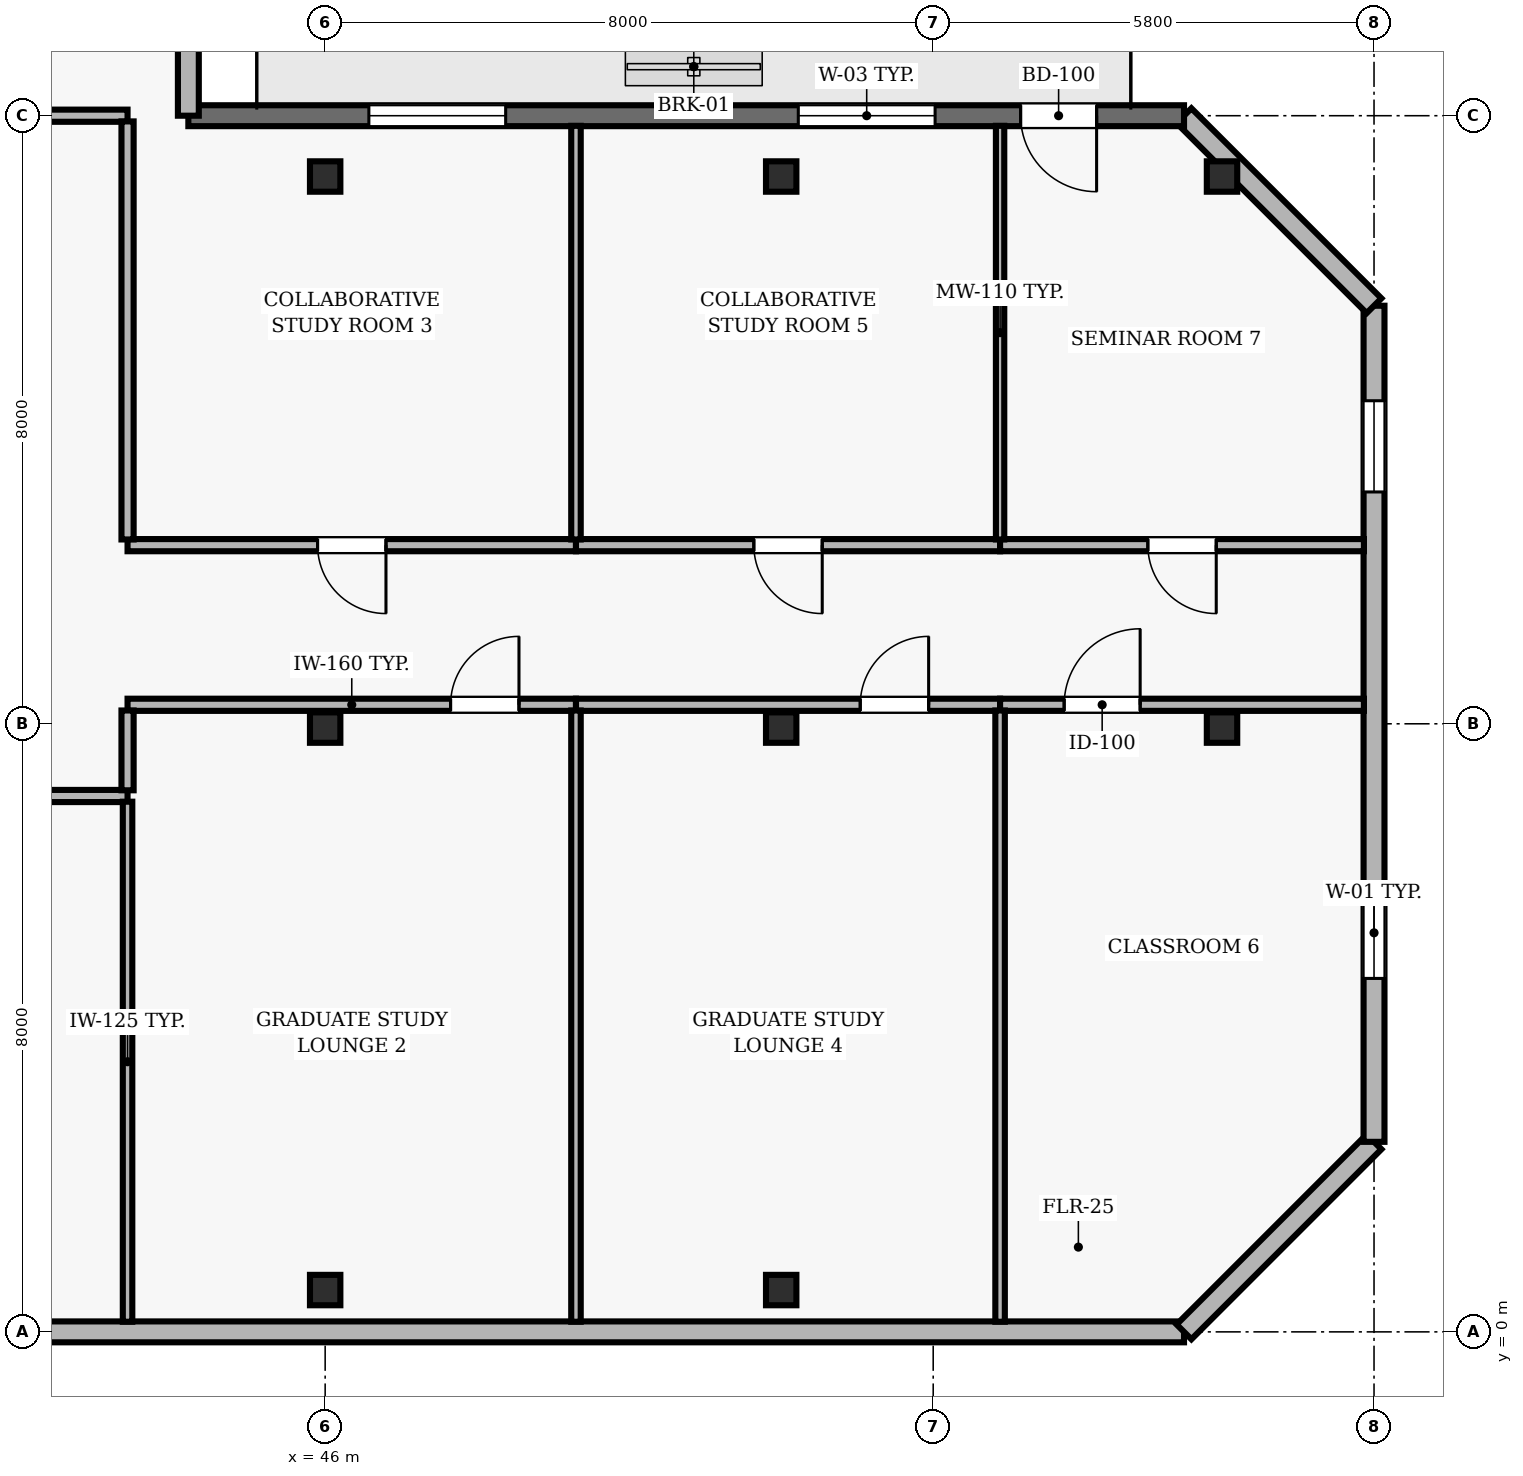
"""IFC4 building model, lengths in metres.
Left out: names, types, materials, properties, quantities, classifications, styles, units other than length and angle.
Written with IfcOpenShell. Run it as: python <this file> out.ifc"""

import sys

from ifc_helpers import new_model, si_unit, direction, frame, frame_2d, origin, origin_2d, place, context, subcontext, project, spatial, rectangle, hollow_rectangle, extrude, element, fill, save


model = new_model("IFC4")
c1 = context("Model", 3, precision=1e-05, world=origin(), true_north=direction((0.0, 1.0)))
c2 = subcontext(c1, "Body", "Model", "MODEL_VIEW")
j1 = project(units=[si_unit("LENGTHUNIT", "METRE"), si_unit("PLANEANGLEUNIT", "RADIAN")], contexts=[c1])
p1 = place(None, origin())
s1 = spatial("IfcSite", under=j1, at=p1, CompositionType="ELEMENT")
p2 = place(p1, origin())
s2 = spatial("IfcBuilding", under=s1, at=p2, CompositionType="ELEMENT")
p3 = place(p2, frame((0.0, 0.0, 287.2)))
s3 = spatial("IfcBuildingStorey", under=s2, at=p3, CompositionType="ELEMENT", Elevation=287.2)
for number, where, z_axis, x_axis in (
    (1, (46.0, 0.55, 0.0), (0.0, 0.0, 1.0), (1.0, 0.0, 0.0)),
    (2, (46.0, 7.95, 0.0), (0.0, 0.0, 1.0), (1.0, 0.0, 0.0)),
    (3, (46.0, 15.2, 0.0), (0.0, 0.0, 1.0), (1.0, 0.0, 0.0)),
    (4, (52.0, 0.55, 0.0), (0.0, 0.0, 1.0), (1.0, 0.0, 0.0)),
    (5, (52.0, 7.95, 0.0), (0.0, 0.0, 1.0), (1.0, 0.0, 0.0)),
    (6, (52.0, 15.2, 0.0), (0.0, 0.0, 1.0), (1.0, 0.0, 0.0)),
    (7, (57.8, 7.95, 0.0), (0.0, 0.0, 1.0), (1.0, 0.0, 0.0)),
    (8, (57.8, 15.2, 0.0), (0.0, 0.0, 1.0), (1.0, 0.0, 0.0)),
):
    element("IfcColumn", number, at=place(p3, frame(where, z_axis=z_axis, x_axis=x_axis)), inside=s3, PredefinedType="COLUMN", context=c2, shape_type="SweptSolid", body=[
        extrude(hollow_rectangle(XDim=0.4, YDim=0.4, WallThickness=0.02, at=origin_2d()), origin(), (0.0, 0.0, 1.0), 3.9),
    ])
p4 = place(p3, frame((24.5, 0.0, 0.0), z_axis=(0.0, 0.0, 1.0), x_axis=(1.0, 0.0, 0.0)))
e9 = element("IfcWall", 9, at=p4, inside=s3, PredefinedType="SOLIDWALL", context=c2, shape_type="SweptSolid", body=[
    extrude(rectangle(XDim=32.8, YDim=0.275, at=frame_2d((16.4, 0.0))), origin(), (0.0, 0.0, 1.0), 3.69),
])
p5 = place(p4, frame((1.533, 0.0, 0.9)))
e10 = element("IfcOpeningElement", 10, at=p5, cuts=e9, PredefinedType="OPENING", context=c2, shape_type="SweptSolid", body=[
    extrude(rectangle(XDim=2.4, YDim=2.2, at=frame_2d((1.2, 1.1))), frame((0.0, 0.147, 0.0), z_axis=(0.0, -1.0, 0.0), x_axis=(1.0, 0.0, 0.0)), (0.0, 0.0, 1.0), 0.295),
])
p6 = place(p3, frame((57.3, 0.0, 0.0), z_axis=(0.0, 0.0, 1.0), x_axis=(0.707106781187, 0.707106781187, 0.0)))
e11 = element("IfcWall", 11, at=p6, inside=s3, PredefinedType="SOLIDWALL", context=c2, shape_type="SweptSolid", body=[
    extrude(rectangle(XDim=3.536, YDim=0.275, at=frame_2d((1.768, 0.0))), origin(), (0.0, 0.0, 1.0), 3.69),
])
p7 = place(p3, frame((59.8, 2.5, 0.0), z_axis=(0.0, 0.0, 1.0), x_axis=(0.0, 1.0, 0.0)))
e12 = element("IfcWall", 12, at=p7, inside=s3, PredefinedType="SOLIDWALL", context=c2, shape_type="SweptSolid", body=[
    extrude(rectangle(XDim=11.0, YDim=0.275, at=frame_2d((5.5, 0.0))), origin(), (0.0, 0.0, 1.0), 3.69),
])
p8 = place(p7, frame((2.15, 0.0, 0.9)))
e13 = element("IfcOpeningElement", 13, at=p8, cuts=e12, PredefinedType="OPENING", context=c2, shape_type="SweptSolid", body=[
    extrude(rectangle(XDim=1.2, YDim=1.6, at=frame_2d((0.6, 0.8))), frame((0.0, 0.147, 0.0), z_axis=(0.0, -1.0, 0.0), x_axis=(1.0, 0.0, 0.0)), (0.0, 0.0, 1.0), 0.295),
])
p9 = place(p7, frame((8.55, 0.0, 0.9)))
e14 = element("IfcOpeningElement", 14, at=p9, cuts=e12, PredefinedType="OPENING", context=c2, shape_type="SweptSolid", body=[
    extrude(rectangle(XDim=1.2, YDim=1.6, at=frame_2d((0.6, 0.8))), frame((0.0, 0.147, 0.0), z_axis=(0.0, -1.0, 0.0), x_axis=(1.0, 0.0, 0.0)), (0.0, 0.0, 1.0), 0.295),
])
p10 = place(p3, frame((59.8, 13.5, 0.0), z_axis=(0.0, 0.0, 1.0), x_axis=(-0.707106781187, 0.707106781187, 0.0)))
e15 = element("IfcWall", 15, at=p10, inside=s3, PredefinedType="SOLIDWALL", context=c2, shape_type="SweptSolid", body=[
    extrude(rectangle(XDim=3.536, YDim=0.275, at=frame_2d((1.768, 0.0))), origin(), (0.0, 0.0, 1.0), 3.69),
])
p11 = place(p3, frame((57.3, 16.0, 0.0), z_axis=(0.0, 0.0, 1.0), x_axis=(-1.0, 0.0, 0.0)))
e16 = element("IfcWall", 16, at=p11, inside=s3, PredefinedType="SOLIDWALL", context=c2, shape_type="SweptSolid", body=[
    extrude(rectangle(XDim=13.1, YDim=0.275, at=frame_2d((6.55, 0.0))), origin(), (0.0, 0.0, 1.0), 3.69),
])
p12 = place(p11, frame((1.15, 0.0, 0.0)))
e17 = element("IfcOpeningElement", 17, at=p12, cuts=e16, PredefinedType="OPENING", context=c2, shape_type="SweptSolid", body=[
    extrude(rectangle(XDim=1.0, YDim=2.2, at=frame_2d((0.5, 1.1))), frame((0.0, 0.147, 0.0), z_axis=(0.0, -1.0, 0.0), x_axis=(1.0, 0.0, 0.0)), (0.0, 0.0, 1.0), 0.295),
])
p13 = place(p11, frame((3.275, 0.0, 0.9)))
e18 = element("IfcOpeningElement", 18, at=p13, cuts=e16, PredefinedType="OPENING", context=c2, shape_type="SweptSolid", body=[
    extrude(rectangle(XDim=1.8, YDim=1.6, at=frame_2d((0.9, 0.8))), frame((0.0, 0.147, 0.0), z_axis=(0.0, -1.0, 0.0), x_axis=(1.0, 0.0, 0.0)), (0.0, 0.0, 1.0), 0.295),
])
p14 = place(p11, frame((8.925, 0.0, 0.9)))
e19 = element("IfcOpeningElement", 19, at=p14, cuts=e16, PredefinedType="OPENING", context=c2, shape_type="SweptSolid", body=[
    extrude(rectangle(XDim=1.8, YDim=1.6, at=frame_2d((0.9, 0.8))), frame((0.0, 0.147, 0.0), z_axis=(0.0, -1.0, 0.0), x_axis=(1.0, 0.0, 0.0)), (0.0, 0.0, 1.0), 0.295),
])
p15 = place(p3, frame((44.2, 16.0, 0.0), z_axis=(0.0, 0.0, 1.0), x_axis=(0.0, 1.0, 0.0)))
e20 = element("IfcWall", 20, at=p15, inside=s3, PredefinedType="SOLIDWALL", context=c2, shape_type="SweptSolid", body=[
    extrude(rectangle(XDim=4.4, YDim=0.275, at=frame_2d((2.2, 0.0))), origin(), (0.0, 0.0, 1.0), 3.69),
])
p16 = place(p3, frame((38.05, 7.05, 0.0), z_axis=(0.0, 0.0, 1.0), x_axis=(1.0, 0.0, 0.0)))
e21 = element("IfcWall", 21, at=p16, inside=s3, PredefinedType="PARTITIONING", context=c2, shape_type="SweptSolid", body=[
    extrude(rectangle(XDim=5.35, YDim=0.16, at=frame_2d((2.675, 0.0))), origin(), (0.0, 0.0, 1.0), 3.69),
])
p17 = place(p16, frame((2.225, 0.0, 0.0)))
e22 = element("IfcOpeningElement", 22, at=p17, cuts=e21, PredefinedType="OPENING", context=c2, shape_type="SweptSolid", body=[
    extrude(rectangle(XDim=0.9, YDim=2.1, at=frame_2d((0.45, 1.05))), frame((0.0, 0.09, 0.0), z_axis=(0.0, -1.0, 0.0), x_axis=(1.0, 0.0, 0.0)), (0.0, 0.0, 1.0), 0.18),
])
p18 = place(p3, frame((43.4, 8.25, 0.0), z_axis=(0.0, 0.0, 1.0), x_axis=(1.0, 0.0, 0.0)))
e23 = element("IfcWall", 23, at=p18, inside=s3, PredefinedType="PARTITIONING", context=c2, shape_type="SweptSolid", body=[
    extrude(rectangle(XDim=5.9, YDim=0.16, at=frame_2d((2.95, 0.0))), origin(), (0.0, 0.0, 1.0), 3.221),
])
p19 = place(p18, frame((4.25, 0.0, 0.0)))
e24 = element("IfcOpeningElement", 24, at=p19, cuts=e23, PredefinedType="OPENING", context=c2, shape_type="SweptSolid", body=[
    extrude(rectangle(XDim=0.9, YDim=2.1, at=frame_2d((0.45, 1.05))), frame((0.0, 0.09, 0.0), z_axis=(0.0, -1.0, 0.0), x_axis=(1.0, 0.0, 0.0)), (0.0, 0.0, 1.0), 0.18),
])
p20 = place(p3, frame((43.4, 16.0, 0.0), z_axis=(0.0, 0.0, 1.0), x_axis=(-1.0, 0.0, 0.0)))
e25 = element("IfcWall", 25, at=p20, inside=s3, PredefinedType="PARTITIONING", context=c2, shape_type="SweptSolid", body=[
    extrude(rectangle(XDim=5.35, YDim=0.16, at=frame_2d((2.675, 0.0))), origin(), (0.0, 0.0, 1.0), 3.39),
])
p21 = place(p20, frame((2.225, 0.0, 0.0)))
e26 = element("IfcOpeningElement", 26, at=p21, cuts=e25, PredefinedType="OPENING", context=c2, shape_type="SweptSolid", body=[
    extrude(rectangle(XDim=0.9, YDim=2.1, at=frame_2d((0.45, 1.05))), frame((0.0, 0.09, 0.0), z_axis=(0.0, -1.0, 0.0), x_axis=(1.0, 0.0, 0.0)), (0.0, 0.0, 1.0), 0.18),
])
p22 = place(p3, frame((49.3, 8.25, 0.0), z_axis=(0.0, 0.0, 1.0), x_axis=(1.0, 0.0, 0.0)))
e27 = element("IfcWall", 27, at=p22, inside=s3, PredefinedType="PARTITIONING", context=c2, shape_type="SweptSolid", body=[
    extrude(rectangle(XDim=5.58, YDim=0.16, at=frame_2d((2.79, 0.0))), origin(), (0.0, 0.0, 1.0), 3.221),
])
p23 = place(p22, frame((3.74, 0.0, 0.0)))
e28 = element("IfcOpeningElement", 28, at=p23, cuts=e27, PredefinedType="OPENING", context=c2, shape_type="SweptSolid", body=[
    extrude(rectangle(XDim=0.9, YDim=2.1, at=frame_2d((0.45, 1.05))), frame((0.0, 0.09, 0.0), z_axis=(0.0, -1.0, 0.0), x_axis=(1.0, 0.0, 0.0)), (0.0, 0.0, 1.0), 0.18),
])
p24 = place(p3, frame((49.3, 10.35, 0.0), z_axis=(0.0, 0.0, 1.0), x_axis=(-1.0, 0.0, 0.0)))
e29 = element("IfcWall", 29, at=p24, inside=s3, PredefinedType="PARTITIONING", context=c2, shape_type="SweptSolid", body=[
    extrude(rectangle(XDim=5.9, YDim=0.16, at=frame_2d((2.95, 0.0))), origin(), (0.0, 0.0, 1.0), 3.372),
])
p25 = place(p24, frame((2.5, 0.0, 0.0)))
e30 = element("IfcOpeningElement", 30, at=p25, cuts=e29, PredefinedType="OPENING", context=c2, shape_type="SweptSolid", body=[
    extrude(rectangle(XDim=0.9, YDim=2.1, at=frame_2d((0.45, 1.05))), frame((0.0, 0.09, 0.0), z_axis=(0.0, -1.0, 0.0), x_axis=(1.0, 0.0, 0.0)), (0.0, 0.0, 1.0), 0.18),
])
p26 = place(p3, frame((54.88, 8.25, 0.0), z_axis=(0.0, 0.0, 1.0), x_axis=(1.0, 0.0, 0.0)))
e31 = element("IfcWall", 31, at=p26, inside=s3, PredefinedType="PARTITIONING", context=c2, shape_type="SweptSolid", body=[
    extrude(rectangle(XDim=4.787, YDim=0.16, at=frame_2d((2.394, 0.0))), origin(), (0.0, 0.0, 1.0), 3.221),
])
p27 = place(p26, frame((0.843, 0.0, 0.0)))
e32 = element("IfcOpeningElement", 32, at=p27, cuts=e31, PredefinedType="OPENING", context=c2, shape_type="SweptSolid", body=[
    extrude(rectangle(XDim=1.0, YDim=2.1, at=frame_2d((0.5, 1.05))), frame((0.0, 0.09, 0.0), z_axis=(0.0, -1.0, 0.0), x_axis=(1.0, 0.0, 0.0)), (0.0, 0.0, 1.0), 0.18),
])
p28 = place(p3, frame((54.88, 10.35, 0.0), z_axis=(0.0, 0.0, 1.0), x_axis=(-1.0, 0.0, 0.0)))
e33 = element("IfcWall", 33, at=p28, inside=s3, PredefinedType="PARTITIONING", context=c2, shape_type="SweptSolid", body=[
    extrude(rectangle(XDim=5.58, YDim=0.16, at=frame_2d((2.79, 0.0))), origin(), (0.0, 0.0, 1.0), 3.372),
])
p29 = place(p28, frame((2.34, 0.0, 0.0)))
e34 = element("IfcOpeningElement", 34, at=p29, cuts=e33, PredefinedType="OPENING", context=c2, shape_type="SweptSolid", body=[
    extrude(rectangle(XDim=0.9, YDim=2.1, at=frame_2d((0.45, 1.05))), frame((0.0, 0.09, 0.0), z_axis=(0.0, -1.0, 0.0), x_axis=(1.0, 0.0, 0.0)), (0.0, 0.0, 1.0), 0.18),
])
p30 = place(p3, frame((59.667, 10.35, 0.0), z_axis=(0.0, 0.0, 1.0), x_axis=(-1.0, 0.0, 0.0)))
e35 = element("IfcWall", 35, at=p30, inside=s3, PredefinedType="PARTITIONING", context=c2, shape_type="SweptSolid", body=[
    extrude(rectangle(XDim=4.787, YDim=0.16, at=frame_2d((2.394, 0.0))), origin(), (0.0, 0.0, 1.0), 3.372),
])
p31 = place(p30, frame((1.943, 0.0, 0.0)))
e36 = element("IfcOpeningElement", 36, at=p31, cuts=e35, PredefinedType="OPENING", context=c2, shape_type="SweptSolid", body=[
    extrude(rectangle(XDim=0.9, YDim=2.1, at=frame_2d((0.45, 1.05))), frame((0.0, 0.09, 0.0), z_axis=(0.0, -1.0, 0.0), x_axis=(1.0, 0.0, 0.0)), (0.0, 0.0, 1.0), 0.18),
])
p32 = place(p3, frame((43.4, 0.133, 0.0), z_axis=(0.0, 0.0, 1.0), x_axis=(0.0, 1.0, 0.0)))
e37 = element("IfcWall", 37, at=p32, inside=s3, PredefinedType="PARTITIONING", context=c2, shape_type="SweptSolid", body=[
    extrude(rectangle(XDim=6.842, YDim=0.125, at=frame_2d((3.421, 0.0))), origin(), (0.0, 0.0, 1.0), 3.69),
])
p33 = place(p3, frame((43.4, 7.125, 0.0), z_axis=(0.0, 0.0, 1.0), x_axis=(0.0, 1.0, 0.0)))
e38 = element("IfcWall", 38, at=p33, inside=s3, PredefinedType="PARTITIONING", context=c2, shape_type="SweptSolid", body=[
    extrude(rectangle(XDim=1.05, YDim=0.16, at=frame_2d((0.525, 0.0))), origin(), (0.0, 0.0, 1.0), 3.69),
])
p34 = place(p3, frame((43.4, 10.425, 0.0), z_axis=(0.0, 0.0, 1.0), x_axis=(0.0, 1.0, 0.0)))
e39 = element("IfcWall", 39, at=p34, inside=s3, PredefinedType="PARTITIONING", context=c2, shape_type="SweptSolid", body=[
    extrude(rectangle(XDim=5.5, YDim=0.16, at=frame_2d((2.75, 0.0))), origin(), (0.0, 0.0, 1.0), 3.69),
])
p35 = place(p3, frame((49.3, 0.133, 0.0), z_axis=(0.0, 0.0, 1.0), x_axis=(0.0, 1.0, 0.0)))
e40 = element("IfcWall", 40, at=p35, inside=s3, PredefinedType="PARTITIONING", context=c2, shape_type="SweptSolid", body=[
    extrude(rectangle(XDim=8.042, YDim=0.125, at=frame_2d((4.021, 0.0))), origin(), (0.0, 0.0, 1.0), 3.69),
])
p36 = place(p3, frame((49.3, 10.425, 0.0), z_axis=(0.0, 0.0, 1.0), x_axis=(0.0, 1.0, 0.0)))
e41 = element("IfcWall", 41, at=p36, inside=s3, PredefinedType="PARTITIONING", context=c2, shape_type="SweptSolid", body=[
    extrude(rectangle(XDim=5.442, YDim=0.125, at=frame_2d((2.721, 0.0))), origin(), (0.0, 0.0, 1.0), 3.69),
])
p37 = place(p3, frame((54.88, 0.133, 0.0), z_axis=(0.0, 0.0, 1.0), x_axis=(0.0, 1.0, 0.0)))
e42 = element("IfcWall", 42, at=p37, inside=s3, PredefinedType="PARTITIONING", context=c2, shape_type="SweptSolid", body=[
    extrude(rectangle(XDim=8.042, YDim=0.125, at=frame_2d((4.021, 0.0))), origin(), (0.0, 0.0, 1.0), 3.69),
])
p38 = place(p3, frame((54.88, 10.425, 0.0), z_axis=(0.0, 0.0, 1.0), x_axis=(0.0, 1.0, 0.0)))
e43 = element("IfcWall", 43, at=p38, inside=s3, PredefinedType="MOVABLE", context=c2, shape_type="SweptSolid", body=[
    extrude(rectangle(XDim=5.442, YDim=0.11, at=frame_2d((2.721, 0.0))), origin(), (0.0, 0.0, 1.0), 3.69),
])
p39 = place(p8, origin())
e44 = element("IfcWindow", 44, at=p39, inside=s3, PartitioningType="SINGLE_PANEL", PredefinedType="WINDOW", context=c2, shape_type="SweptSolid", body=[
    extrude(rectangle(XDim=1.2, YDim=1.6, at=frame_2d((0.6, 0.8))), frame((0.0, 0.03, 0.0), z_axis=(0.0, -1.0, 0.0), x_axis=(1.0, 0.0, 0.0)), (0.0, 0.0, 1.0), 0.06),
])
fill(e13, e44)
p40 = place(p9, origin())
e45 = element("IfcWindow", 45, at=p40, inside=s3, PartitioningType="SINGLE_PANEL", PredefinedType="WINDOW", context=c2, shape_type="SweptSolid", body=[
    extrude(rectangle(XDim=1.2, YDim=1.6, at=frame_2d((0.6, 0.8))), frame((0.0, 0.03, 0.0), z_axis=(0.0, -1.0, 0.0), x_axis=(1.0, 0.0, 0.0)), (0.0, 0.0, 1.0), 0.06),
])
fill(e14, e45)
p41 = place(p12, origin())
e46 = element("IfcDoor", 46, at=p41, inside=s3, OperationType="SINGLE_SWING_LEFT", PredefinedType="DOOR", context=c2, shape_type="SweptSolid", body=[
    extrude(rectangle(XDim=1.0, YDim=2.2, at=frame_2d((0.5, 1.1))), frame((0.0, 0.025, 0.0), z_axis=(0.0, -1.0, 0.0), x_axis=(1.0, 0.0, 0.0)), (0.0, 0.0, 1.0), 0.05),
])
fill(e17, e46)
p42 = place(p13, origin())
e47 = element("IfcWindow", 47, at=p42, inside=s3, PartitioningType="SINGLE_PANEL", PredefinedType="WINDOW", context=c2, shape_type="SweptSolid", body=[
    extrude(rectangle(XDim=1.8, YDim=1.6, at=frame_2d((0.9, 0.8))), frame((0.0, 0.03, 0.0), z_axis=(0.0, -1.0, 0.0), x_axis=(1.0, 0.0, 0.0)), (0.0, 0.0, 1.0), 0.06),
])
fill(e18, e47)
p43 = place(p14, origin())
e48 = element("IfcWindow", 48, at=p43, inside=s3, PartitioningType="SINGLE_PANEL", PredefinedType="WINDOW", context=c2, shape_type="SweptSolid", body=[
    extrude(rectangle(XDim=1.8, YDim=1.6, at=frame_2d((0.9, 0.8))), frame((0.0, 0.03, 0.0), z_axis=(0.0, -1.0, 0.0), x_axis=(1.0, 0.0, 0.0)), (0.0, 0.0, 1.0), 0.06),
])
fill(e19, e48)
p44 = place(p19, origin())
e49 = element("IfcDoor", 49, at=p44, inside=s3, OperationType="SINGLE_SWING_RIGHT", PredefinedType="DOOR", context=c2, shape_type="SweptSolid", body=[
    extrude(rectangle(XDim=0.9, YDim=2.1, at=frame_2d((0.45, 1.05))), frame((0.0, 0.025, 0.0), z_axis=(0.0, -1.0, 0.0), x_axis=(1.0, 0.0, 0.0)), (0.0, 0.0, 1.0), 0.05),
])
fill(e24, e49)
p45 = place(p25, origin())
e50 = element("IfcDoor", 50, at=p45, inside=s3, OperationType="SINGLE_SWING_LEFT", PredefinedType="DOOR", context=c2, shape_type="SweptSolid", body=[
    extrude(rectangle(XDim=0.9, YDim=2.1, at=frame_2d((0.45, 1.05))), frame((0.0, 0.025, 0.0), z_axis=(0.0, -1.0, 0.0), x_axis=(1.0, 0.0, 0.0)), (0.0, 0.0, 1.0), 0.05),
])
fill(e30, e50)
p46 = place(p23, origin())
e51 = element("IfcDoor", 51, at=p46, inside=s3, OperationType="SINGLE_SWING_RIGHT", PredefinedType="DOOR", context=c2, shape_type="SweptSolid", body=[
    extrude(rectangle(XDim=0.9, YDim=2.1, at=frame_2d((0.45, 1.05))), frame((0.0, 0.025, 0.0), z_axis=(0.0, -1.0, 0.0), x_axis=(1.0, 0.0, 0.0)), (0.0, 0.0, 1.0), 0.05),
])
fill(e28, e51)
p47 = place(p29, origin())
e52 = element("IfcDoor", 52, at=p47, inside=s3, OperationType="SINGLE_SWING_LEFT", PredefinedType="DOOR", context=c2, shape_type="SweptSolid", body=[
    extrude(rectangle(XDim=0.9, YDim=2.1, at=frame_2d((0.45, 1.05))), frame((0.0, 0.025, 0.0), z_axis=(0.0, -1.0, 0.0), x_axis=(1.0, 0.0, 0.0)), (0.0, 0.0, 1.0), 0.05),
])
fill(e34, e52)
p48 = place(p27, origin())
e53 = element("IfcDoor", 53, at=p48, inside=s3, OperationType="SINGLE_SWING_RIGHT", PredefinedType="DOOR", context=c2, shape_type="SweptSolid", body=[
    extrude(rectangle(XDim=1.0, YDim=2.1, at=frame_2d((0.5, 1.05))), frame((0.0, 0.025, 0.0), z_axis=(0.0, -1.0, 0.0), x_axis=(1.0, 0.0, 0.0)), (0.0, 0.0, 1.0), 0.05),
])
fill(e32, e53)
p49 = place(p31, origin())
e54 = element("IfcDoor", 54, at=p49, inside=s3, OperationType="SINGLE_SWING_LEFT", PredefinedType="DOOR", context=c2, shape_type="SweptSolid", body=[
    extrude(rectangle(XDim=0.9, YDim=2.1, at=frame_2d((0.45, 1.05))), frame((0.0, 0.025, 0.0), z_axis=(0.0, -1.0, 0.0), x_axis=(1.0, 0.0, 0.0)), (0.0, 0.0, 1.0), 0.05),
])
fill(e36, e54)
save(model, sys.argv[1])
